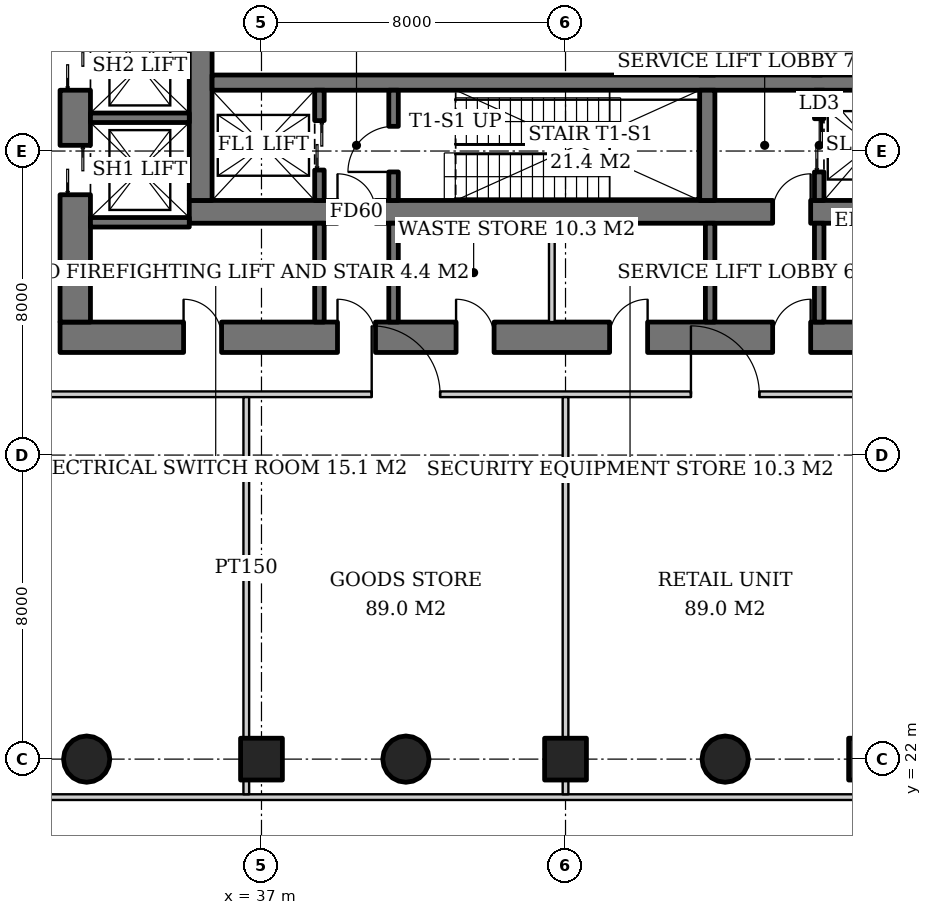
"""IFC4 building model, lengths in metres.
Left out: names, types, materials, properties, quantities, classifications, styles, units other than length and angle.
Written with IfcOpenShell. Run it as: python <this file> out.ifc"""

import sys

from ifc_helpers import new_model, si_unit, direction, frame, frame_2d, origin, origin_2d, place, context, subcontext, project, spatial, rectangle, hollow_circle, extrude, element, fill, save


model = new_model("IFC4")
c1 = context("Model", 3, precision=1e-05, world=origin(), true_north=direction((0.0, 1.0)))
c2 = subcontext(c1, "Body", "Model", "MODEL_VIEW")
j1 = project(units=[si_unit("LENGTHUNIT", "METRE"), si_unit("PLANEANGLEUNIT", "RADIAN")], contexts=[c1])
p1 = place(None, origin())
s1 = spatial("IfcSite", under=j1, at=p1, CompositionType="ELEMENT")
p2 = place(p1, origin())
s2 = spatial("IfcBuilding", under=s1, at=p2, CompositionType="ELEMENT")
p3 = place(p2, frame((0.0, 0.0, 6.0)))
s3 = spatial("IfcBuildingStorey", under=s2, at=p3, CompositionType="ELEMENT", Elevation=6.0)
for number, where, z_axis, x_axis in (
    (1, (32.4, 22.0, 0.0), (0.0, 0.0, 1.0), (1.0, 0.0, 0.0)),
    (2, (40.8, 22.0, 0.0), (0.0, 0.0, 1.0), (1.0, 0.0, 0.0)),
    (3, (49.2, 22.0, 0.0), (0.0, 0.0, 1.0), (1.0, 0.0, 0.0)),
):
    element("IfcColumn", number, at=place(p3, frame(where, z_axis=z_axis, x_axis=x_axis)), inside=s3, PredefinedType="COLUMN", context=c2, shape_type="SweptSolid", body=[
        extrude(hollow_circle(Radius=0.61, WallThickness=0.04, at=origin_2d()), origin(), (0.0, 0.0, 1.0), 5.0),
    ])
p4 = place(p3, frame((35.1, 36.4, 0.0), z_axis=(0.0, 0.0, 1.0), x_axis=(1.0, 0.0, 0.0)))
e4 = element("IfcWall", 4, at=p4, inside=s3, PredefinedType="SHEAR", context=c2, shape_type="SweptSolid", body=[
    extrude(rectangle(XDim=19.8, YDim=0.6, at=frame_2d((9.9, 0.0))), origin(), (0.0, 0.0, 1.0), 5.0),
])
p5 = place(p4, frame((3.9, 0.0, 0.0)))
e5 = element("IfcOpeningElement", 5, at=p5, cuts=e4, PredefinedType="OPENING", context=c2, shape_type="SweptSolid", body=[
    extrude(rectangle(XDim=1.0, YDim=2.1, at=frame_2d((0.5, 1.05))), frame((0.0, 0.31, 0.0), z_axis=(0.0, -1.0, 0.0), x_axis=(1.0, 0.0, 0.0)), (0.0, 0.0, 1.0), 0.62),
])
p6 = place(p4, frame((15.35, 0.0, 0.0)))
e6 = element("IfcOpeningElement", 6, at=p6, cuts=e4, PredefinedType="OPENING", context=c2, shape_type="SweptSolid", body=[
    extrude(rectangle(XDim=1.0, YDim=2.1, at=frame_2d((0.5, 1.05))), frame((0.0, 0.31, 0.0), z_axis=(0.0, -1.0, 0.0), x_axis=(1.0, 0.0, 0.0)), (0.0, 0.0, 1.0), 0.62),
])
p7 = place(p3, frame((35.4, 36.7, 0.0), z_axis=(0.0, 0.0, 1.0), x_axis=(0.0, 1.0, 0.0)))
e7 = element("IfcWall", 7, at=p7, inside=s3, PredefinedType="SHEAR", context=c2, shape_type="SweptSolid", body=[
    extrude(rectangle(XDim=18.6, YDim=0.6, at=frame_2d((9.3, 0.0))), origin(), (0.0, 0.0, 1.0), 5.0),
])
p8 = place(p7, frame((8.4, 0.0, 0.0)))
e8 = element("IfcOpeningElement", 8, at=p8, cuts=e7, PredefinedType="OPENING", context=c2, shape_type="SweptSolid", body=[
    extrude(rectangle(XDim=1.8, YDim=2.4, at=frame_2d((0.9, 1.2))), frame((0.0, 0.31, 0.0), z_axis=(0.0, -1.0, 0.0), x_axis=(1.0, 0.0, 0.0)), (0.0, 0.0, 1.0), 0.62),
])
p9 = place(p3, frame((31.7, 33.1, 0.0), z_axis=(0.0, 0.0, 1.0), x_axis=(1.0, 0.0, 0.0)))
e9 = element("IfcWall", 9, at=p9, inside=s3, PredefinedType="SHEAR", context=c2, shape_type="SweptSolid", body=[
    extrude(rectangle(XDim=26.6, YDim=0.8, at=frame_2d((13.3, 0.0))), origin(), (0.0, 0.0, 1.0), 5.0),
])
p10 = place(p9, frame((7.3, 0.0, 0.0)))
e10 = element("IfcOpeningElement", 10, at=p10, cuts=e9, PredefinedType="OPENING", context=c2, shape_type="SweptSolid", body=[
    extrude(rectangle(XDim=1.0, YDim=2.1, at=frame_2d((0.5, 1.05))), frame((0.0, 0.41, 0.0), z_axis=(0.0, -1.0, 0.0), x_axis=(1.0, 0.0, 0.0)), (0.0, 0.0, 1.0), 0.82),
])
p11 = place(p9, frame((18.75, 0.0, 0.0)))
e11 = element("IfcOpeningElement", 11, at=p11, cuts=e9, PredefinedType="OPENING", context=c2, shape_type="SweptSolid", body=[
    extrude(rectangle(XDim=1.0, YDim=2.1, at=frame_2d((0.5, 1.05))), frame((0.0, 0.41, 0.0), z_axis=(0.0, -1.0, 0.0), x_axis=(1.0, 0.0, 0.0)), (0.0, 0.0, 1.0), 0.82),
])
p12 = place(p9, frame((3.25, 0.0, 0.0)))
e12 = element("IfcOpeningElement", 12, at=p12, cuts=e9, PredefinedType="OPENING", context=c2, shape_type="SweptSolid", body=[
    extrude(rectangle(XDim=1.0, YDim=2.1, at=frame_2d((0.5, 1.05))), frame((0.0, 0.41, 0.0), z_axis=(0.0, -1.0, 0.0), x_axis=(1.0, 0.0, 0.0)), (0.0, 0.0, 1.0), 0.82),
])
p13 = place(p9, frame((10.42, 0.0, 0.0)))
e13 = element("IfcOpeningElement", 13, at=p13, cuts=e9, PredefinedType="OPENING", context=c2, shape_type="SweptSolid", body=[
    extrude(rectangle(XDim=1.0, YDim=2.1, at=frame_2d((0.5, 1.05))), frame((0.0, 0.41, 0.0), z_axis=(0.0, -1.0, 0.0), x_axis=(1.0, 0.0, 0.0)), (0.0, 0.0, 1.0), 0.82),
])
p14 = place(p9, frame((14.46, 0.0, 0.0)))
e14 = element("IfcOpeningElement", 14, at=p14, cuts=e9, PredefinedType="OPENING", context=c2, shape_type="SweptSolid", body=[
    extrude(rectangle(XDim=1.0, YDim=2.1, at=frame_2d((0.5, 1.05))), frame((0.0, 0.41, 0.0), z_axis=(0.0, -1.0, 0.0), x_axis=(1.0, 0.0, 0.0)), (0.0, 0.0, 1.0), 0.82),
])
p15 = place(p9, frame((22.45, 0.0, 0.0)))
e15 = element("IfcOpeningElement", 15, at=p15, cuts=e9, PredefinedType="OPENING", context=c2, shape_type="SweptSolid", body=[
    extrude(rectangle(XDim=1.0, YDim=2.1, at=frame_2d((0.5, 1.05))), frame((0.0, 0.41, 0.0), z_axis=(0.0, -1.0, 0.0), x_axis=(1.0, 0.0, 0.0)), (0.0, 0.0, 1.0), 0.82),
])
p16 = place(p3, frame((32.1, 33.5, 0.0), z_axis=(0.0, 0.0, 1.0), x_axis=(0.0, 1.0, 0.0)))
e16 = element("IfcWall", 16, at=p16, inside=s3, PredefinedType="SHEAR", context=c2, shape_type="SweptSolid", body=[
    extrude(rectangle(XDim=25.0, YDim=0.8, at=frame_2d((12.5, 0.0))), origin(), (0.0, 0.0, 1.0), 5.0),
])
p17 = place(p16, frame((3.35, 0.0, 0.0)))
e17 = element("IfcOpeningElement", 17, at=p17, cuts=e16, PredefinedType="OPENING", context=c2, shape_type="SweptSolid", body=[
    extrude(rectangle(XDim=1.3, YDim=2.2, at=frame_2d((0.65, 1.1))), frame((0.0, 0.41, 0.0), z_axis=(0.0, -1.0, 0.0), x_axis=(1.0, 0.0, 0.0)), (0.0, 0.0, 1.0), 0.82),
])
p18 = place(p16, frame((6.1, 0.0, 0.0)))
e18 = element("IfcOpeningElement", 18, at=p18, cuts=e16, PredefinedType="OPENING", context=c2, shape_type="SweptSolid", body=[
    extrude(rectangle(XDim=1.3, YDim=2.2, at=frame_2d((0.65, 1.1))), frame((0.0, 0.41, 0.0), z_axis=(0.0, -1.0, 0.0), x_axis=(1.0, 0.0, 0.0)), (0.0, 0.0, 1.0), 0.82),
])
p19 = place(p16, frame((8.85, 0.0, 0.0)))
e19 = element("IfcOpeningElement", 19, at=p19, cuts=e16, PredefinedType="OPENING", context=c2, shape_type="SweptSolid", body=[
    extrude(rectangle(XDim=1.3, YDim=2.2, at=frame_2d((0.65, 1.1))), frame((0.0, 0.41, 0.0), z_axis=(0.0, -1.0, 0.0), x_axis=(1.0, 0.0, 0.0)), (0.0, 0.0, 1.0), 0.82),
])
p20 = place(p16, frame((14.85, 0.0, 0.0)))
e20 = element("IfcOpeningElement", 20, at=p20, cuts=e16, PredefinedType="OPENING", context=c2, shape_type="SweptSolid", body=[
    extrude(rectangle(XDim=1.3, YDim=2.2, at=frame_2d((0.65, 1.1))), frame((0.0, 0.41, 0.0), z_axis=(0.0, -1.0, 0.0), x_axis=(1.0, 0.0, 0.0)), (0.0, 0.0, 1.0), 0.82),
])
p21 = place(p16, frame((17.6, 0.0, 0.0)))
e21 = element("IfcOpeningElement", 21, at=p21, cuts=e16, PredefinedType="OPENING", context=c2, shape_type="SweptSolid", body=[
    extrude(rectangle(XDim=1.3, YDim=2.2, at=frame_2d((0.65, 1.1))), frame((0.0, 0.41, 0.0), z_axis=(0.0, -1.0, 0.0), x_axis=(1.0, 0.0, 0.0)), (0.0, 0.0, 1.0), 0.82),
])
p22 = place(p16, frame((11.6, 0.0, 0.0)))
e22 = element("IfcOpeningElement", 22, at=p22, cuts=e16, PredefinedType="OPENING", context=c2, shape_type="SweptSolid", body=[
    extrude(rectangle(XDim=1.8, YDim=2.4, at=frame_2d((0.9, 1.2))), frame((0.0, 0.41, 0.0), z_axis=(0.0, -1.0, 0.0), x_axis=(1.0, 0.0, 0.0)), (0.0, 0.0, 1.0), 0.82),
])
p23 = place(p3, frame((35.7, 39.8, 0.0), z_axis=(0.0, 0.0, 1.0), x_axis=(1.0, 0.0, 0.0)))
e23 = element("IfcWall", 23, at=p23, inside=s3, PredefinedType="SHEAR", context=c2, shape_type="SweptSolid", body=[
    extrude(rectangle(XDim=18.6, YDim=0.4, at=frame_2d((9.3, 0.0))), origin(), (0.0, 0.0, 1.0), 5.0),
])
p24 = place(p3, frame((48.73, 36.7, 0.0), z_axis=(0.0, 0.0, 1.0), x_axis=(0.0, 1.0, 0.0)))
e24 = element("IfcWall", 24, at=p24, inside=s3, PredefinedType="SHEAR", context=c2, shape_type="SweptSolid", body=[
    extrude(rectangle(XDim=2.9, YDim=0.4, at=frame_2d((1.45, 0.0))), origin(), (0.0, 0.0, 1.0), 5.0),
])
p25 = place(p3, frame((48.73, 40.0, 0.0), z_axis=(0.0, 0.0, 1.0), x_axis=(0.0, 1.0, 0.0)))
e25 = element("IfcWall", 25, at=p25, inside=s3, PredefinedType="SHEAR", context=c2, shape_type="SweptSolid", body=[
    extrude(rectangle(XDim=12.0, YDim=0.4, at=frame_2d((6.0, 0.0))), origin(), (0.0, 0.0, 1.0), 5.0),
])
for number, where, z_axis, x_axis in (
    (26, (37.0, 22.0, 0.0), (0.0, 0.0, 1.0), (1.0, 0.0, 0.0)),
    (27, (45.0, 22.0, 0.0), (0.0, 0.0, 1.0), (1.0, 0.0, 0.0)),
    (28, (53.0, 22.0, 0.0), (0.0, 0.0, 1.0), (1.0, 0.0, 0.0)),
):
    element("IfcColumn", number, at=place(p3, frame(where, z_axis=z_axis, x_axis=x_axis)), inside=s3, PredefinedType="COLUMN", context=c2, shape_type="SweptSolid", body=[
        extrude(rectangle(XDim=1.1, YDim=1.1, at=origin_2d()), origin(), (0.0, 0.0, 1.0), 5.0),
    ])
p26 = place(p3, frame((38.525, 36.7, 0.0), z_axis=(0.0, 0.0, 1.0), x_axis=(0.0, 1.0, 0.0)))
e29 = element("IfcWall", 29, at=p26, inside=s3, PredefinedType="SHEAR", context=c2, shape_type="SweptSolid", body=[
    extrude(rectangle(XDim=2.9, YDim=0.25, at=frame_2d((1.45, 0.0))), origin(), (0.0, 0.0, 1.0), 5.0),
])
p27 = place(p26, frame((0.8, 0.0, 0.0)))
e30 = element("IfcOpeningElement", 30, at=p27, cuts=e29, PredefinedType="OPENING", context=c2, shape_type="SweptSolid", body=[
    extrude(rectangle(XDim=1.3, YDim=2.2, at=frame_2d((0.65, 1.1))), frame((0.0, 0.135, 0.0), z_axis=(0.0, -1.0, 0.0), x_axis=(1.0, 0.0, 0.0)), (0.0, 0.0, 1.0), 0.27),
])
p28 = place(p3, frame((40.475, 36.7, 0.0), z_axis=(0.0, 0.0, 1.0), x_axis=(0.0, 1.0, 0.0)))
e31 = element("IfcWall", 31, at=p28, inside=s3, PredefinedType="SHEAR", context=c2, shape_type="SweptSolid", body=[
    extrude(rectangle(XDim=2.9, YDim=0.25, at=frame_2d((1.45, 0.0))), origin(), (0.0, 0.0, 1.0), 5.0),
])
p29 = place(p28, frame((0.75, 0.0, 0.0)))
e32 = element("IfcOpeningElement", 32, at=p29, cuts=e31, PredefinedType="OPENING", context=c2, shape_type="SweptSolid", body=[
    extrude(rectangle(XDim=1.2, YDim=2.1, at=frame_2d((0.6, 1.05))), frame((0.0, 0.135, 0.0), z_axis=(0.0, -1.0, 0.0), x_axis=(1.0, 0.0, 0.0)), (0.0, 0.0, 1.0), 0.27),
])
p30 = place(p3, frame((51.675, 36.7, 0.0), z_axis=(0.0, 0.0, 1.0), x_axis=(0.0, 1.0, 0.0)))
e33 = element("IfcWall", 33, at=p30, inside=s3, PredefinedType="SHEAR", context=c2, shape_type="SweptSolid", body=[
    extrude(rectangle(XDim=2.9, YDim=0.25, at=frame_2d((1.45, 0.0))), origin(), (0.0, 0.0, 1.0), 5.0),
])
p31 = place(p30, frame((0.75, 0.0, 0.0)))
e34 = element("IfcOpeningElement", 34, at=p31, cuts=e33, PredefinedType="OPENING", context=c2, shape_type="SweptSolid", body=[
    extrude(rectangle(XDim=1.4, YDim=2.4, at=frame_2d((0.7, 1.2))), frame((0.0, 0.135, 0.0), z_axis=(0.0, -1.0, 0.0), x_axis=(1.0, 0.0, 0.0)), (0.0, 0.0, 1.0), 0.27),
])
p32 = place(p3, frame((51.615, 44.25, 0.0), z_axis=(0.0, 0.0, 1.0), x_axis=(0.0, -1.0, 0.0)))
e35 = element("IfcWall", 35, at=p32, inside=s3, PredefinedType="SHEAR", context=c2, shape_type="SweptSolid", body=[
    extrude(rectangle(XDim=4.25, YDim=0.25, at=frame_2d((2.125, 0.0))), origin(), (0.0, 0.0, 1.0), 5.0),
])
for number, where, z_axis, x_axis in (
    (36, (32.5, 36.125, 0.0), (0.0, 0.0, 1.0), (1.0, 0.0, 0.0)),
    (37, (32.5, 38.875, 0.0), (0.0, 0.0, 1.0), (1.0, 0.0, 0.0)),
):
    element("IfcWall", number, at=place(p3, frame(where, z_axis=z_axis, x_axis=x_axis)), inside=s3, PredefinedType="SHEAR", context=c2, shape_type="SweptSolid", body=[
        extrude(rectangle(XDim=2.6, YDim=0.25, at=frame_2d((1.3, 0.0))), origin(), (0.0, 0.0, 1.0), 5.0),
    ])
for number, where, z_axis, x_axis in (
    (38, (38.525, 33.5, 0.0), (0.0, 0.0, 1.0), (0.0, 1.0, 0.0)),
    (39, (40.475, 33.5, 0.0), (0.0, 0.0, 1.0), (0.0, 1.0, 0.0)),
    (40, (48.805, 33.5, 0.0), (0.0, 0.0, 1.0), (0.0, 1.0, 0.0)),
    (41, (51.675, 33.5, 0.0), (0.0, 0.0, 1.0), (0.0, 1.0, 0.0)),
):
    element("IfcWall", number, at=place(p3, frame(where, z_axis=z_axis, x_axis=x_axis)), inside=s3, PredefinedType="SOLIDWALL", context=c2, shape_type="SweptSolid", body=[
        extrude(rectangle(XDim=2.6, YDim=0.25, at=frame_2d((1.3, 0.0))), origin(), (0.0, 0.0, 1.0), 4.7),
    ])
p33 = place(p3, frame((44.64, 33.5, 0.0), z_axis=(0.0, 0.0, 1.0), x_axis=(0.0, 1.0, 0.0)))
e42 = element("IfcWall", 42, at=p33, inside=s3, PredefinedType="SOLIDWALL", context=c2, shape_type="SweptSolid", body=[
    extrude(rectangle(XDim=2.6, YDim=0.15, at=frame_2d((1.3, 0.0))), origin(), (0.0, 0.0, 1.0), 4.7),
])
p34 = place(p3, frame((19.925, 21.0, 0.0), z_axis=(0.0, 0.0, 1.0), x_axis=(1.0, 0.0, 0.0)))
e43 = element("IfcWall", 43, at=p34, inside=s3, PredefinedType="PARTITIONING", context=c2, shape_type="SweptSolid", body=[
    extrude(rectangle(XDim=50.15, YDim=0.15, at=frame_2d((25.075, 0.0))), origin(), (0.0, 0.0, 1.0), 3.2),
])
p35 = place(p3, frame((19.925, 31.6, 0.0), z_axis=(0.0, 0.0, 1.0), x_axis=(1.0, 0.0, 0.0)))
e44 = element("IfcWall", 44, at=p35, inside=s3, PredefinedType="PARTITIONING", context=c2, shape_type="SweptSolid", body=[
    extrude(rectangle(XDim=50.15, YDim=0.15, at=frame_2d((25.075, 0.0))), origin(), (0.0, 0.0, 1.0), 3.688),
])
p36 = place(p35, frame((7.475, 0.0, 0.0)))
e45 = element("IfcOpeningElement", 45, at=p36, cuts=e44, PredefinedType="OPENING", context=c2, shape_type="SweptSolid", body=[
    extrude(rectangle(XDim=1.8, YDim=2.4, at=frame_2d((0.9, 1.2))), frame((0.0, 0.085, 0.0), z_axis=(0.0, -1.0, 0.0), x_axis=(1.0, 0.0, 0.0)), (0.0, 0.0, 1.0), 0.17),
])
p37 = place(p35, frame((19.975, 0.0, 0.0)))
e46 = element("IfcOpeningElement", 46, at=p37, cuts=e44, PredefinedType="OPENING", context=c2, shape_type="SweptSolid", body=[
    extrude(rectangle(XDim=1.8, YDim=2.4, at=frame_2d((0.9, 1.2))), frame((0.0, 0.085, 0.0), z_axis=(0.0, -1.0, 0.0), x_axis=(1.0, 0.0, 0.0)), (0.0, 0.0, 1.0), 0.17),
])
p38 = place(p35, frame((28.375, 0.0, 0.0)))
e47 = element("IfcOpeningElement", 47, at=p38, cuts=e44, PredefinedType="OPENING", context=c2, shape_type="SweptSolid", body=[
    extrude(rectangle(XDim=1.8, YDim=2.4, at=frame_2d((0.9, 1.2))), frame((0.0, 0.085, 0.0), z_axis=(0.0, -1.0, 0.0), x_axis=(1.0, 0.0, 0.0)), (0.0, 0.0, 1.0), 0.17),
])
p39 = place(p35, frame((40.875, 0.0, 0.0)))
e48 = element("IfcOpeningElement", 48, at=p39, cuts=e44, PredefinedType="OPENING", context=c2, shape_type="SweptSolid", body=[
    extrude(rectangle(XDim=1.8, YDim=2.4, at=frame_2d((0.9, 1.2))), frame((0.0, 0.085, 0.0), z_axis=(0.0, -1.0, 0.0), x_axis=(1.0, 0.0, 0.0)), (0.0, 0.0, 1.0), 0.17),
])
p40 = place(p3, frame((36.6, 21.075, 0.0), z_axis=(0.0, 0.0, 1.0), x_axis=(0.0, 1.0, 0.0)))
e49 = element("IfcWall", 49, at=p40, inside=s3, PredefinedType="PARTITIONING", context=c2, shape_type="SweptSolid", body=[
    extrude(rectangle(XDim=0.375, YDim=0.15, at=frame_2d((0.188, 0.0))), origin(), (0.0, 0.0, 1.0), 3.2),
])
p41 = place(p3, frame((36.6, 22.55, 0.0), z_axis=(0.0, 0.0, 1.0), x_axis=(0.0, 1.0, 0.0)))
e50 = element("IfcWall", 50, at=p41, inside=s3, PredefinedType="PARTITIONING", context=c2, shape_type="SweptSolid", body=[
    extrude(rectangle(XDim=8.975, YDim=0.15, at=frame_2d((4.487, 0.0))), origin(), (0.0, 0.0, 1.0), 4.7),
])
p42 = place(p3, frame((45.0, 21.075, 0.0), z_axis=(0.0, 0.0, 1.0), x_axis=(0.0, 1.0, 0.0)))
e51 = element("IfcWall", 51, at=p42, inside=s3, PredefinedType="PARTITIONING", context=c2, shape_type="SweptSolid", body=[
    extrude(rectangle(XDim=0.375, YDim=0.15, at=frame_2d((0.188, 0.0))), origin(), (0.0, 0.0, 1.0), 3.2),
])
p43 = place(p3, frame((45.0, 22.55, 0.0), z_axis=(0.0, 0.0, 1.0), x_axis=(0.0, 1.0, 0.0)))
e52 = element("IfcWall", 52, at=p43, inside=s3, PredefinedType="PARTITIONING", context=c2, shape_type="SweptSolid", body=[
    extrude(rectangle(XDim=8.975, YDim=0.15, at=frame_2d((4.487, 0.0))), origin(), (0.0, 0.0, 1.0), 4.7),
])
p44 = place(p27, origin())
e53 = element("IfcDoor", 53, at=p44, inside=s3, OperationType="DOUBLE_DOOR_SLIDING", PredefinedType="DOOR", context=c2, shape_type="SweptSolid", body=[
    extrude(rectangle(XDim=1.3, YDim=2.2, at=frame_2d((0.65, 1.1))), frame((0.0, 0.025, 0.0), z_axis=(0.0, -1.0, 0.0), x_axis=(1.0, 0.0, 0.0)), (0.0, 0.0, 1.0), 0.05),
])
fill(e30, e53)
p45 = place(p29, origin())
e54 = element("IfcDoor", 54, at=p45, inside=s3, OperationType="SINGLE_SWING_LEFT", PredefinedType="DOOR", context=c2, shape_type="SweptSolid", body=[
    extrude(rectangle(XDim=1.2, YDim=2.1, at=frame_2d((0.6, 1.05))), frame((0.0, 0.025, 0.0), z_axis=(0.0, -1.0, 0.0), x_axis=(1.0, 0.0, 0.0)), (0.0, 0.0, 1.0), 0.05),
])
fill(e32, e54)
p46 = place(p31, origin())
e55 = element("IfcDoor", 55, at=p46, inside=s3, OperationType="DOUBLE_DOOR_SLIDING", PredefinedType="DOOR", context=c2, shape_type="SweptSolid", body=[
    extrude(rectangle(XDim=1.4, YDim=2.4, at=frame_2d((0.7, 1.2))), frame((0.0, 0.025, 0.0), z_axis=(0.0, -1.0, 0.0), x_axis=(1.0, 0.0, 0.0)), (0.0, 0.0, 1.0), 0.05),
])
fill(e34, e55)
p47 = place(p5, origin())
e56 = element("IfcDoor", 56, at=p47, inside=s3, OperationType="SINGLE_SWING_LEFT", PredefinedType="DOOR", context=c2, shape_type="SweptSolid", body=[
    extrude(rectangle(XDim=1.0, YDim=2.1, at=frame_2d((0.5, 1.05))), frame((0.0, 0.025, 0.0), z_axis=(0.0, -1.0, 0.0), x_axis=(1.0, 0.0, 0.0)), (0.0, 0.0, 1.0), 0.05),
])
fill(e5, e56)
p48 = place(p6, origin())
e57 = element("IfcDoor", 57, at=p48, inside=s3, OperationType="SINGLE_SWING_RIGHT", PredefinedType="DOOR", context=c2, shape_type="SweptSolid", body=[
    extrude(rectangle(XDim=1.0, YDim=2.1, at=frame_2d((0.5, 1.05))), frame((0.0, 0.025, 0.0), z_axis=(0.0, -1.0, 0.0), x_axis=(1.0, 0.0, 0.0)), (0.0, 0.0, 1.0), 0.05),
])
fill(e6, e57)
p49 = place(p17, origin())
e58 = element("IfcDoor", 58, at=p49, inside=s3, OperationType="DOUBLE_DOOR_SLIDING", PredefinedType="DOOR", context=c2, shape_type="SweptSolid", body=[
    extrude(rectangle(XDim=1.3, YDim=2.2, at=frame_2d((0.65, 1.1))), frame((0.0, 0.025, 0.0), z_axis=(0.0, -1.0, 0.0), x_axis=(1.0, 0.0, 0.0)), (0.0, 0.0, 1.0), 0.05),
])
fill(e17, e58)
p50 = place(p18, origin())
e59 = element("IfcDoor", 59, at=p50, inside=s3, OperationType="DOUBLE_DOOR_SLIDING", PredefinedType="DOOR", context=c2, shape_type="SweptSolid", body=[
    extrude(rectangle(XDim=1.3, YDim=2.2, at=frame_2d((0.65, 1.1))), frame((0.0, 0.025, 0.0), z_axis=(0.0, -1.0, 0.0), x_axis=(1.0, 0.0, 0.0)), (0.0, 0.0, 1.0), 0.05),
])
fill(e18, e59)
p51 = place(p10, origin())
e60 = element("IfcDoor", 60, at=p51, inside=s3, OperationType="SINGLE_SWING_LEFT", PredefinedType="DOOR", context=c2, shape_type="SweptSolid", body=[
    extrude(rectangle(XDim=1.0, YDim=2.1, at=frame_2d((0.5, 1.05))), frame((0.0, 0.025, 0.0), z_axis=(0.0, -1.0, 0.0), x_axis=(1.0, 0.0, 0.0)), (0.0, 0.0, 1.0), 0.05),
])
fill(e10, e60)
p52 = place(p11, origin())
e61 = element("IfcDoor", 61, at=p52, inside=s3, OperationType="SINGLE_SWING_RIGHT", PredefinedType="DOOR", context=c2, shape_type="SweptSolid", body=[
    extrude(rectangle(XDim=1.0, YDim=2.1, at=frame_2d((0.5, 1.05))), frame((0.0, 0.025, 0.0), z_axis=(0.0, -1.0, 0.0), x_axis=(1.0, 0.0, 0.0)), (0.0, 0.0, 1.0), 0.05),
])
fill(e11, e61)
p53 = place(p12, origin())
e62 = element("IfcDoor", 62, at=p53, inside=s3, OperationType="SINGLE_SWING_LEFT", PredefinedType="DOOR", context=c2, shape_type="SweptSolid", body=[
    extrude(rectangle(XDim=1.0, YDim=2.1, at=frame_2d((0.5, 1.05))), frame((0.0, 0.39, 0.0), z_axis=(0.0, -1.0, 0.0), x_axis=(1.0, 0.0, 0.0)), (0.0, 0.0, 1.0), 0.05),
])
fill(e12, e62)
p54 = place(p13, origin())
e63 = element("IfcDoor", 63, at=p54, inside=s3, OperationType="SINGLE_SWING_LEFT", PredefinedType="DOOR", context=c2, shape_type="SweptSolid", body=[
    extrude(rectangle(XDim=1.0, YDim=2.1, at=frame_2d((0.5, 1.05))), frame((0.0, 0.39, 0.0), z_axis=(0.0, -1.0, 0.0), x_axis=(1.0, 0.0, 0.0)), (0.0, 0.0, 1.0), 0.05),
])
fill(e13, e63)
p55 = place(p14, origin())
e64 = element("IfcDoor", 64, at=p55, inside=s3, OperationType="SINGLE_SWING_RIGHT", PredefinedType="DOOR", context=c2, shape_type="SweptSolid", body=[
    extrude(rectangle(XDim=1.0, YDim=2.1, at=frame_2d((0.5, 1.05))), frame((0.0, 0.39, 0.0), z_axis=(0.0, -1.0, 0.0), x_axis=(1.0, 0.0, 0.0)), (0.0, 0.0, 1.0), 0.05),
])
fill(e14, e64)
p56 = place(p37, origin())
e65 = element("IfcDoor", 65, at=p56, inside=s3, OperationType="DOUBLE_DOOR_SINGLE_SWING", PredefinedType="DOOR", context=c2, shape_type="SweptSolid", body=[
    extrude(rectangle(XDim=1.8, YDim=2.4, at=frame_2d((0.9, 1.2))), frame((0.0, 0.025, 0.0), z_axis=(0.0, -1.0, 0.0), x_axis=(1.0, 0.0, 0.0)), (0.0, 0.0, 1.0), 0.05),
])
fill(e46, e65)
p57 = place(p38, origin())
e66 = element("IfcDoor", 66, at=p57, inside=s3, OperationType="DOUBLE_DOOR_SINGLE_SWING", PredefinedType="DOOR", context=c2, shape_type="SweptSolid", body=[
    extrude(rectangle(XDim=1.8, YDim=2.4, at=frame_2d((0.9, 1.2))), frame((0.0, 0.025, 0.0), z_axis=(0.0, -1.0, 0.0), x_axis=(1.0, 0.0, 0.0)), (0.0, 0.0, 1.0), 0.05),
])
fill(e47, e66)
save(model, sys.argv[1])
